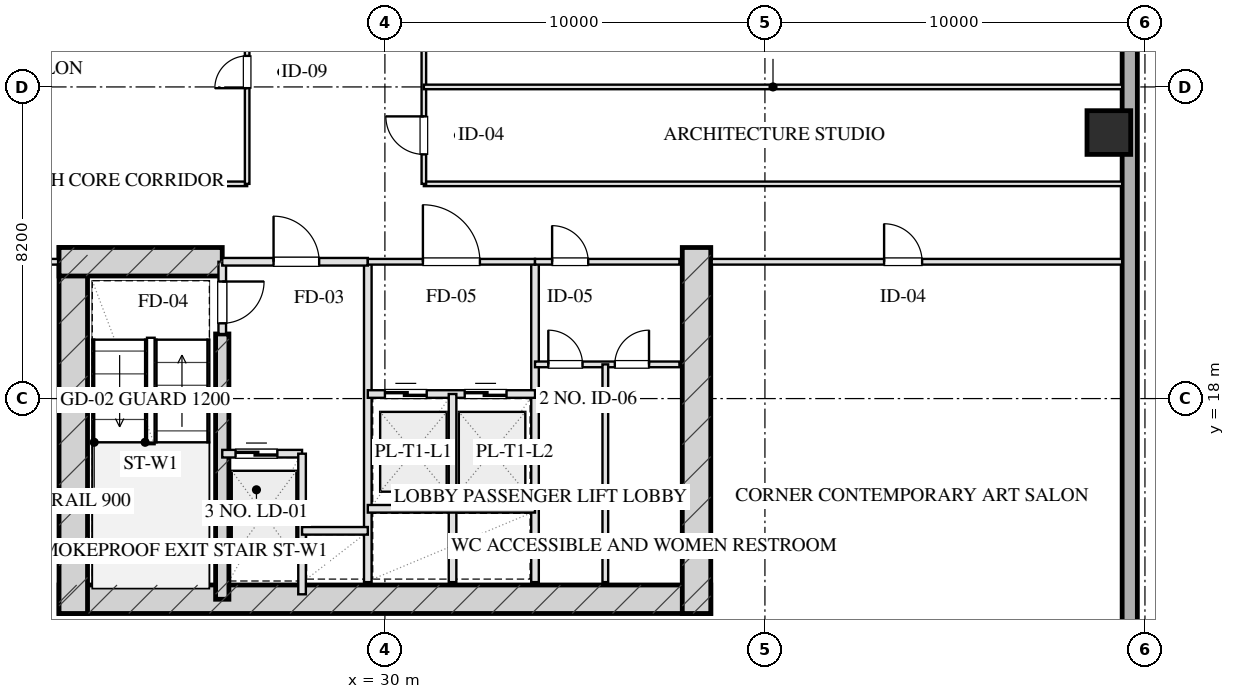
"""IFC4 building model, lengths in metres.
Left out: names, types, materials, properties, quantities, classifications, styles, units other than length and angle.
Written with IfcOpenShell. Run it as: python <this file> out.ifc"""

import sys

from ifc_helpers import new_model, si_unit, direction, frame, frame_2d, origin, origin_2d, place, context, subcontext, project, spatial, rectangle, hollow_rectangle, extrude, element, fill, save


model = new_model("IFC4")
c1 = context("Model", 3, precision=1e-05, world=origin(), true_north=direction((0.0, 1.0)))
c2 = subcontext(c1, "Body", "Model", "MODEL_VIEW")
j1 = project(units=[si_unit("LENGTHUNIT", "METRE"), si_unit("PLANEANGLEUNIT", "RADIAN")], contexts=[c1])
p1 = place(None, origin())
s1 = spatial("IfcSite", under=j1, at=p1, CompositionType="ELEMENT")
p2 = place(p1, origin())
s2 = spatial("IfcBuilding", under=s1, at=p2, CompositionType="ELEMENT")
p3 = place(p2, frame((0.0, 0.0, 54.05)))
s3 = spatial("IfcBuildingStorey", under=s2, at=p3, CompositionType="ELEMENT", Elevation=54.05)
p4 = place(p3, frame((21.425, 12.72, 0.0), z_axis=(0.0, 0.0, 1.0), x_axis=(1.0, 0.0, 0.0)))
e1 = element("IfcWall", 1, at=p4, inside=s3, PredefinedType="SHEAR", context=c2, shape_type="SweptSolid", body=[
    extrude(rectangle(XDim=17.15, YDim=0.75, at=frame_2d((8.575, 0.0))), origin(), (0.0, 0.0, 1.0), 3.45),
])
for number, where, z_axis, x_axis in (
    (2, (21.8, 21.975, 0.0), (0.0, 0.0, 1.0), (0.0, -1.0, 0.0)),
    (3, (38.2, 21.975, 0.0), (0.0, 0.0, 1.0), (0.0, -1.0, 0.0)),
):
    element("IfcWall", number, at=place(p3, frame(where, z_axis=z_axis, x_axis=x_axis)), inside=s3, PredefinedType="SHEAR", context=c2, shape_type="SweptSolid", body=[
        extrude(rectangle(XDim=9.63, YDim=0.75, at=frame_2d((4.815, 0.0))), origin(), (0.0, 0.0, 1.0), 3.45),
    ])
p5 = place(p3, frame((25.72, 19.7, 0.0), z_axis=(0.0, 0.0, 1.0), x_axis=(0.0, -1.0, 0.0)))
e4 = element("IfcWall", 4, at=p5, inside=s3, PredefinedType="SHEAR", context=c2, shape_type="SweptSolid", body=[
    extrude(rectangle(XDim=6.98, YDim=0.35, at=frame_2d((3.49, 0.0))), origin(), (0.0, 0.0, 1.0), 3.45),
])
p6 = place(p3, frame((21.425, 21.6, 0.0), z_axis=(0.0, 0.0, 1.0), x_axis=(1.0, 0.0, 0.0)))
e5 = element("IfcWall", 5, at=p6, inside=s3, PredefinedType="SHEAR", context=c2, shape_type="SweptSolid", body=[
    extrude(rectangle(XDim=4.295, YDim=0.75, at=frame_2d((2.147, 0.0))), origin(), (0.0, 0.0, 1.0), 3.45),
])
p7 = place(p3, frame((49.05, 25.0, 0.0), z_axis=(0.0, 0.0, 1.0), x_axis=(1.0, 0.0, 0.0)))
e6 = element("IfcColumn", 6, at=p7, inside=s3, PredefinedType="COLUMN", context=c2, shape_type="SweptSolid", body=[
    extrude(hollow_rectangle(XDim=1.15, YDim=1.15, WallThickness=0.04, at=origin_2d()), origin(), (0.0, 0.0, 1.0), 3.451),
])
p8 = place(p3, frame((49.6, 60.8, 0.0), z_axis=(0.0, 0.0, 1.0), x_axis=(0.0, -1.0, 0.0)))
e7 = element("IfcWall", 7, at=p8, inside=s3, PredefinedType="SOLIDWALL", context=c2, shape_type="SweptSolid", body=[
    extrude(rectangle(XDim=53.6, YDim=0.4, at=frame_2d((26.8, 0.0))), origin(), (0.0, 0.0, 1.0), 2.61),
])
p9 = place(p3, frame((25.72, 21.6, 0.0), z_axis=(0.0, 0.0, 1.0), x_axis=(0.0, -1.0, 0.0)))
e8 = element("IfcWall", 8, at=p9, inside=s3, PredefinedType="PARTITIONING", context=c2, shape_type="SweptSolid", body=[
    extrude(rectangle(XDim=1.9, YDim=0.2, at=frame_2d((0.95, 0.0))), origin(), (0.0, 0.0, 1.0), 3.175),
])
p10 = place(p9, frame((0.52, 0.0, 0.0)))
e9 = element("IfcOpeningElement", 9, at=p10, cuts=e8, PredefinedType="OPENING", context=c2, shape_type="SweptSolid", body=[
    extrude(rectangle(XDim=1.1, YDim=2.05, at=frame_2d((0.55, 1.025))), frame((0.0, 0.11, 0.0), z_axis=(0.0, -1.0, 0.0), x_axis=(1.0, 0.0, 0.0)), (0.0, 0.0, 1.0), 0.22),
])
p11 = place(p3, frame((29.55, 21.6, 0.0), z_axis=(0.0, 0.0, 1.0), x_axis=(0.0, -1.0, 0.0)))
e10 = element("IfcWall", 10, at=p11, inside=s3, PredefinedType="PARTITIONING", context=c2, shape_type="SweptSolid", body=[
    extrude(rectangle(XDim=8.43, YDim=0.2, at=frame_2d((4.215, 0.0))), origin(), (0.0, 0.0, 1.0), 3.175),
])
p12 = place(p3, frame((25.72, 21.6, 0.0), z_axis=(0.0, 0.0, 1.0), x_axis=(1.0, 0.0, 0.0)))
e11 = element("IfcWall", 11, at=p12, inside=s3, PredefinedType="PARTITIONING", context=c2, shape_type="SweptSolid", body=[
    extrude(rectangle(XDim=3.83, YDim=0.2, at=frame_2d((1.915, 0.0))), origin(), (0.0, 0.0, 1.0), 3.175),
])
p13 = place(p12, frame((1.35, 0.0, 0.0)))
e12 = element("IfcOpeningElement", 12, at=p13, cuts=e11, PredefinedType="OPENING", context=c2, shape_type="SweptSolid", body=[
    extrude(rectangle(XDim=1.2, YDim=2.05, at=frame_2d((0.6, 1.025))), frame((0.0, 0.11, 0.0), z_axis=(0.0, -1.0, 0.0), x_axis=(1.0, 0.0, 0.0)), (0.0, 0.0, 1.0), 0.22),
])
p14 = place(p3, frame((25.72, 16.55, 0.0), z_axis=(0.0, 0.0, 1.0), x_axis=(1.0, 0.0, 0.0)))
e13 = element("IfcWall", 13, at=p14, inside=s3, PredefinedType="PARTITIONING", context=c2, shape_type="SweptSolid", body=[
    extrude(rectangle(XDim=2.1, YDim=0.2, at=frame_2d((1.05, 0.0))), origin(), (0.0, 0.0, 1.0), 3.175),
])
p15 = place(p14, frame((0.35, 0.0, 0.0)))
e14 = element("IfcOpeningElement", 14, at=p15, cuts=e13, PredefinedType="OPENING", context=c2, shape_type="SweptSolid", body=[
    extrude(rectangle(XDim=1.1, YDim=2.05, at=frame_2d((0.55, 1.025))), frame((0.0, 0.11, 0.0), z_axis=(0.0, -1.0, 0.0), x_axis=(1.0, 0.0, 0.0)), (0.0, 0.0, 1.0), 0.22),
])
p16 = place(p3, frame((27.82, 16.55, 0.0), z_axis=(0.0, 0.0, 1.0), x_axis=(0.0, -1.0, 0.0)))
e15 = element("IfcWall", 15, at=p16, inside=s3, PredefinedType="PARTITIONING", context=c2, shape_type="SweptSolid", body=[
    extrude(rectangle(XDim=3.7, YDim=0.2, at=frame_2d((1.85, 0.0))), origin(), (0.0, 0.0, 1.0), 3.175),
])
p17 = place(p3, frame((27.82, 14.52, 0.0), z_axis=(0.0, 0.0, 1.0), x_axis=(1.0, 0.0, 0.0)))
e16 = element("IfcWall", 16, at=p17, inside=s3, PredefinedType="PARTITIONING", context=c2, shape_type="SweptSolid", body=[
    extrude(rectangle(XDim=1.73, YDim=0.2, at=frame_2d((0.865, 0.0))), origin(), (0.0, 0.0, 1.0), 3.175),
])
p18 = place(p3, frame((33.95, 21.6, 0.0), z_axis=(0.0, 0.0, 1.0), x_axis=(0.0, -1.0, 0.0)))
e17 = element("IfcWall", 17, at=p18, inside=s3, PredefinedType="PARTITIONING", context=c2, shape_type="SweptSolid", body=[
    extrude(rectangle(XDim=8.43, YDim=0.2, at=frame_2d((4.215, 0.0))), origin(), (0.0, 0.0, 1.0), 3.175),
])
p19 = place(p3, frame((29.55, 21.6, 0.0), z_axis=(0.0, 0.0, 1.0), x_axis=(1.0, 0.0, 0.0)))
e18 = element("IfcWall", 18, at=p19, inside=s3, PredefinedType="PARTITIONING", context=c2, shape_type="SweptSolid", body=[
    extrude(rectangle(XDim=4.4, YDim=0.15, at=frame_2d((2.2, 0.0))), origin(), (0.0, 0.0, 1.0), 3.175),
])
p20 = place(p19, frame((1.45, 0.0, 0.0)))
e19 = element("IfcOpeningElement", 19, at=p20, cuts=e18, PredefinedType="OPENING", context=c2, shape_type="SweptSolid", body=[
    extrude(rectangle(XDim=1.5, YDim=2.05, at=frame_2d((0.75, 1.025))), frame((0.0, 0.085, 0.0), z_axis=(0.0, -1.0, 0.0), x_axis=(1.0, 0.0, 0.0)), (0.0, 0.0, 1.0), 0.17),
])
p21 = place(p3, frame((29.55, 18.12, 0.0), z_axis=(0.0, 0.0, 1.0), x_axis=(1.0, 0.0, 0.0)))
e20 = element("IfcWall", 20, at=p21, inside=s3, PredefinedType="PARTITIONING", context=c2, shape_type="SweptSolid", body=[
    extrude(rectangle(XDim=4.4, YDim=0.2, at=frame_2d((2.2, 0.0))), origin(), (0.0, 0.0, 1.0), 3.175),
])
p22 = place(p21, frame((0.45, 0.0, 0.0)))
e21 = element("IfcOpeningElement", 21, at=p22, cuts=e20, PredefinedType="OPENING", context=c2, shape_type="SweptSolid", body=[
    extrude(rectangle(XDim=1.1, YDim=2.05, at=frame_2d((0.55, 1.025))), frame((0.0, 0.11, 0.0), z_axis=(0.0, -1.0, 0.0), x_axis=(1.0, 0.0, 0.0)), (0.0, 0.0, 1.0), 0.22),
])
p23 = place(p21, frame((2.55, 0.0, 0.0)))
e22 = element("IfcOpeningElement", 22, at=p23, cuts=e20, PredefinedType="OPENING", context=c2, shape_type="SweptSolid", body=[
    extrude(rectangle(XDim=1.1, YDim=2.05, at=frame_2d((0.55, 1.025))), frame((0.0, 0.11, 0.0), z_axis=(0.0, -1.0, 0.0), x_axis=(1.0, 0.0, 0.0)), (0.0, 0.0, 1.0), 0.22),
])
p24 = place(p3, frame((31.78, 18.12, 0.0), z_axis=(0.0, 0.0, 1.0), x_axis=(0.0, -1.0, 0.0)))
e23 = element("IfcWall", 23, at=p24, inside=s3, PredefinedType="PARTITIONING", context=c2, shape_type="SweptSolid", body=[
    extrude(rectangle(XDim=4.95, YDim=0.2, at=frame_2d((2.475, 0.0))), origin(), (0.0, 0.0, 1.0), 3.175),
])
p25 = place(p3, frame((29.55, 15.1, 0.0), z_axis=(0.0, 0.0, 1.0), x_axis=(1.0, 0.0, 0.0)))
e24 = element("IfcWall", 24, at=p25, inside=s3, PredefinedType="PARTITIONING", context=c2, shape_type="SweptSolid", body=[
    extrude(rectangle(XDim=4.4, YDim=0.2, at=frame_2d((2.2, 0.0))), origin(), (0.0, 0.0, 1.0), 3.175),
])
p26 = place(p3, frame((33.95, 21.6, 0.0), z_axis=(0.0, 0.0, 1.0), x_axis=(1.0, 0.0, 0.0)))
e25 = element("IfcWall", 25, at=p26, inside=s3, PredefinedType="PARTITIONING", context=c2, shape_type="SweptSolid", body=[
    extrude(rectangle(XDim=3.8, YDim=0.15, at=frame_2d((1.9, 0.0))), origin(), (0.0, 0.0, 1.0), 3.175),
])
p27 = place(p26, frame((0.45, 0.0, 0.0)))
e26 = element("IfcOpeningElement", 26, at=p27, cuts=e25, PredefinedType="OPENING", context=c2, shape_type="SweptSolid", body=[
    extrude(rectangle(XDim=0.95, YDim=2.05, at=frame_2d((0.475, 1.025))), frame((0.0, 0.085, 0.0), z_axis=(0.0, -1.0, 0.0), x_axis=(1.0, 0.0, 0.0)), (0.0, 0.0, 1.0), 0.17),
])
p28 = place(p3, frame((33.95, 18.9, 0.0), z_axis=(0.0, 0.0, 1.0), x_axis=(1.0, 0.0, 0.0)))
e27 = element("IfcWall", 27, at=p28, inside=s3, PredefinedType="PARTITIONING", context=c2, shape_type="SweptSolid", body=[
    extrude(rectangle(XDim=3.8, YDim=0.15, at=frame_2d((1.9, 0.0))), origin(), (0.0, 0.0, 1.0), 3.175),
])
p29 = place(p28, frame((0.35, 0.0, 0.0)))
e28 = element("IfcOpeningElement", 28, at=p29, cuts=e27, PredefinedType="OPENING", context=c2, shape_type="SweptSolid", body=[
    extrude(rectangle(XDim=0.9, YDim=2.05, at=frame_2d((0.45, 1.025))), frame((0.0, 0.085, 0.0), z_axis=(0.0, -1.0, 0.0), x_axis=(1.0, 0.0, 0.0)), (0.0, 0.0, 1.0), 0.17),
])
p30 = place(p28, frame((2.1, 0.0, 0.0)))
e29 = element("IfcOpeningElement", 29, at=p30, cuts=e27, PredefinedType="OPENING", context=c2, shape_type="SweptSolid", body=[
    extrude(rectangle(XDim=0.9, YDim=2.05, at=frame_2d((0.45, 1.025))), frame((0.0, 0.085, 0.0), z_axis=(0.0, -1.0, 0.0), x_axis=(1.0, 0.0, 0.0)), (0.0, 0.0, 1.0), 0.17),
])
p31 = place(p3, frame((35.8, 18.9, 0.0), z_axis=(0.0, 0.0, 1.0), x_axis=(0.0, -1.0, 0.0)))
e30 = element("IfcWall", 30, at=p31, inside=s3, PredefinedType="PARTITIONING", context=c2, shape_type="SweptSolid", body=[
    extrude(rectangle(XDim=5.73, YDim=0.15, at=frame_2d((2.865, 0.0))), origin(), (0.0, 0.0, 1.0), 3.175),
])
p32 = place(p3, frame((10.6, 21.6, 0.0), z_axis=(0.0, 0.0, 1.0), x_axis=(1.0, 0.0, 0.0)))
e31 = element("IfcWall", 31, at=p32, inside=s3, PredefinedType="PARTITIONING", context=c2, shape_type="SweptSolid", body=[
    extrude(rectangle(XDim=10.8, YDim=0.15, at=frame_2d((5.4, 0.0))), origin(), (0.0, 0.0, 1.0), 3.175),
])
p33 = place(p32, frame((4.536, 0.0, 0.0)))
e32 = element("IfcOpeningElement", 32, at=p33, cuts=e31, PredefinedType="OPENING", context=c2, shape_type="SweptSolid", body=[
    extrude(rectangle(XDim=1.0, YDim=2.05, at=frame_2d((0.5, 1.025))), frame((0.0, 0.085, 0.0), z_axis=(0.0, -1.0, 0.0), x_axis=(1.0, 0.0, 0.0)), (0.0, 0.0, 1.0), 0.17),
])
p34 = place(p3, frame((38.6, 21.6, 0.0), z_axis=(0.0, 0.0, 1.0), x_axis=(1.0, 0.0, 0.0)))
e33 = element("IfcWall", 33, at=p34, inside=s3, PredefinedType="PARTITIONING", context=c2, shape_type="SweptSolid", body=[
    extrude(rectangle(XDim=10.8, YDim=0.15, at=frame_2d((5.4, 0.0))), origin(), (0.0, 0.0, 1.0), 3.175),
])
p35 = place(p34, frame((4.536, 0.0, 0.0)))
e34 = element("IfcOpeningElement", 34, at=p35, cuts=e33, PredefinedType="OPENING", context=c2, shape_type="SweptSolid", body=[
    extrude(rectangle(XDim=1.0, YDim=2.05, at=frame_2d((0.5, 1.025))), frame((0.0, 0.085, 0.0), z_axis=(0.0, -1.0, 0.0), x_axis=(1.0, 0.0, 0.0)), (0.0, 0.0, 1.0), 0.17),
])
p36 = place(p3, frame((10.6, 23.65, 0.0), z_axis=(0.0, 0.0, 1.0), x_axis=(1.0, 0.0, 0.0)))
e35 = element("IfcWall", 35, at=p36, inside=s3, PredefinedType="PARTITIONING", context=c2, shape_type="SweptSolid", body=[
    extrude(rectangle(XDim=15.775, YDim=0.12, at=frame_2d((7.887, 0.0))), origin(), (0.0, 0.0, 1.0), 3.175),
])
p37 = place(p3, frame((31.025, 23.65, 0.0), z_axis=(0.0, 0.0, 1.0), x_axis=(1.0, 0.0, 0.0)))
e36 = element("IfcWall", 36, at=p37, inside=s3, PredefinedType="PARTITIONING", context=c2, shape_type="SweptSolid", body=[
    extrude(rectangle(XDim=18.375, YDim=0.12, at=frame_2d((9.188, 0.0))), origin(), (0.0, 0.0, 1.0), 3.175),
])
p38 = place(p3, frame((26.375, 23.65, 0.0), z_axis=(0.0, 0.0, 1.0), x_axis=(0.0, 1.0, 0.0)))
e37 = element("IfcWall", 37, at=p38, inside=s3, PredefinedType="PARTITIONING", context=c2, shape_type="SweptSolid", body=[
    extrude(rectangle(XDim=20.7, YDim=0.12, at=frame_2d((10.35, 0.0))), origin(), (0.0, 0.0, 1.0), 3.175),
])
p39 = place(p38, frame((2.518, 0.0, 0.0)))
e38 = element("IfcOpeningElement", 38, at=p39, cuts=e37, PredefinedType="OPENING", context=c2, shape_type="SweptSolid", body=[
    extrude(rectangle(XDim=0.85, YDim=2.05, at=frame_2d((0.425, 1.025))), frame((0.0, 0.07, 0.0), z_axis=(0.0, -1.0, 0.0), x_axis=(1.0, 0.0, 0.0)), (0.0, 0.0, 1.0), 0.14),
])
p40 = place(p38, frame((9.692, 0.0, 0.0)))
e39 = element("IfcOpeningElement", 39, at=p40, cuts=e37, PredefinedType="OPENING", context=c2, shape_type="SweptSolid", body=[
    extrude(rectangle(XDim=1.0, YDim=2.05, at=frame_2d((0.5, 1.025))), frame((0.0, 0.07, 0.0), z_axis=(0.0, -1.0, 0.0), x_axis=(1.0, 0.0, 0.0)), (0.0, 0.0, 1.0), 0.14),
])
p41 = place(p38, frame((17.025, 0.0, 0.0)))
e40 = element("IfcOpeningElement", 40, at=p41, cuts=e37, PredefinedType="OPENING", context=c2, shape_type="SweptSolid", body=[
    extrude(rectangle(XDim=1.0, YDim=2.05, at=frame_2d((0.5, 1.025))), frame((0.0, 0.07, 0.0), z_axis=(0.0, -1.0, 0.0), x_axis=(1.0, 0.0, 0.0)), (0.0, 0.0, 1.0), 0.14),
])
p42 = place(p3, frame((31.025, 23.65, 0.0), z_axis=(0.0, 0.0, 1.0), x_axis=(0.0, 1.0, 0.0)))
e41 = element("IfcWall", 41, at=p42, inside=s3, PredefinedType="PARTITIONING", context=c2, shape_type="SweptSolid", body=[
    extrude(rectangle(XDim=20.7, YDim=0.12, at=frame_2d((10.35, 0.0))), origin(), (0.0, 0.0, 1.0), 3.175),
])
p43 = place(p42, frame((0.775, 0.0, 0.0)))
e42 = element("IfcOpeningElement", 42, at=p43, cuts=e41, PredefinedType="OPENING", context=c2, shape_type="SweptSolid", body=[
    extrude(rectangle(XDim=1.0, YDim=2.05, at=frame_2d((0.5, 1.025))), frame((0.0, 0.07, 0.0), z_axis=(0.0, -1.0, 0.0), x_axis=(1.0, 0.0, 0.0)), (0.0, 0.0, 1.0), 0.14),
])
p44 = place(p42, frame((3.95, 0.0, 0.0)))
e43 = element("IfcOpeningElement", 43, at=p44, cuts=e41, PredefinedType="OPENING", context=c2, shape_type="SweptSolid", body=[
    extrude(rectangle(XDim=1.0, YDim=2.05, at=frame_2d((0.5, 1.025))), frame((0.0, 0.07, 0.0), z_axis=(0.0, -1.0, 0.0), x_axis=(1.0, 0.0, 0.0)), (0.0, 0.0, 1.0), 0.14),
])
p45 = place(p42, frame((8.455, 0.0, 0.0)))
e44 = element("IfcOpeningElement", 44, at=p45, cuts=e41, PredefinedType="OPENING", context=c2, shape_type="SweptSolid", body=[
    extrude(rectangle(XDim=1.05, YDim=2.05, at=frame_2d((0.525, 1.025))), frame((0.0, 0.07, 0.0), z_axis=(0.0, -1.0, 0.0), x_axis=(1.0, 0.0, 0.0)), (0.0, 0.0, 1.0), 0.14),
])
p46 = place(p42, frame((12.923, 0.0, 0.0)))
e45 = element("IfcOpeningElement", 45, at=p46, cuts=e41, PredefinedType="OPENING", context=c2, shape_type="SweptSolid", body=[
    extrude(rectangle(XDim=1.0, YDim=2.05, at=frame_2d((0.5, 1.025))), frame((0.0, 0.07, 0.0), z_axis=(0.0, -1.0, 0.0), x_axis=(1.0, 0.0, 0.0)), (0.0, 0.0, 1.0), 0.14),
])
p47 = place(p42, frame((16.338, 0.0, 0.0)))
e46 = element("IfcOpeningElement", 46, at=p47, cuts=e41, PredefinedType="OPENING", context=c2, shape_type="SweptSolid", body=[
    extrude(rectangle(XDim=1.0, YDim=2.05, at=frame_2d((0.5, 1.025))), frame((0.0, 0.07, 0.0), z_axis=(0.0, -1.0, 0.0), x_axis=(1.0, 0.0, 0.0)), (0.0, 0.0, 1.0), 0.14),
])
p48 = place(p42, frame((19.045, 0.0, 0.0)))
e47 = element("IfcOpeningElement", 47, at=p48, cuts=e41, PredefinedType="OPENING", context=c2, shape_type="SweptSolid", body=[
    extrude(rectangle(XDim=1.0, YDim=2.05, at=frame_2d((0.5, 1.025))), frame((0.0, 0.07, 0.0), z_axis=(0.0, -1.0, 0.0), x_axis=(1.0, 0.0, 0.0)), (0.0, 0.0, 1.0), 0.14),
])
p49 = place(p3, frame((31.025, 26.2, 0.0), z_axis=(0.0, 0.0, 1.0), x_axis=(1.0, 0.0, 0.0)))
e48 = element("IfcWall", 48, at=p49, inside=s3, PredefinedType="PARTITIONING", context=c2, shape_type="SweptSolid", body=[
    extrude(rectangle(XDim=18.375, YDim=0.12, at=frame_2d((9.188, 0.0))), origin(), (0.0, 0.0, 1.0), 3.175),
])
p50 = place(p10, origin())
e49 = element("IfcDoor", 49, at=p50, inside=s3, OperationType="SINGLE_SWING_LEFT", PredefinedType="DOOR", context=c2, shape_type="SweptSolid", body=[
    extrude(rectangle(XDim=1.1, YDim=2.05, at=frame_2d((0.55, 1.025))), frame((0.0, 0.025, 0.0), z_axis=(0.0, -1.0, 0.0), x_axis=(1.0, 0.0, 0.0)), (0.0, 0.0, 1.0), 0.05),
])
fill(e9, e49)
p51 = place(p13, origin())
e50 = element("IfcDoor", 50, at=p51, inside=s3, OperationType="SINGLE_SWING_LEFT", PredefinedType="DOOR", context=c2, shape_type="SweptSolid", body=[
    extrude(rectangle(XDim=1.2, YDim=2.05, at=frame_2d((0.6, 1.025))), frame((0.0, 0.025, 0.0), z_axis=(0.0, -1.0, 0.0), x_axis=(1.0, 0.0, 0.0)), (0.0, 0.0, 1.0), 0.05),
])
fill(e12, e50)
p52 = place(p15, origin())
e51 = element("IfcDoor", 51, at=p52, inside=s3, OperationType="DOUBLE_DOOR_SLIDING", PredefinedType="DOOR", context=c2, shape_type="SweptSolid", body=[
    extrude(rectangle(XDim=1.1, YDim=2.05, at=frame_2d((0.55, 1.025))), frame((0.0, 0.025, 0.0), z_axis=(0.0, -1.0, 0.0), x_axis=(1.0, 0.0, 0.0)), (0.0, 0.0, 1.0), 0.05),
])
fill(e14, e51)
p53 = place(p20, origin())
e52 = element("IfcDoor", 52, at=p53, inside=s3, OperationType="SINGLE_SWING_LEFT", PredefinedType="DOOR", context=c2, shape_type="SweptSolid", body=[
    extrude(rectangle(XDim=1.5, YDim=2.05, at=frame_2d((0.75, 1.025))), frame((0.0, 0.025, 0.0), z_axis=(0.0, -1.0, 0.0), x_axis=(1.0, 0.0, 0.0)), (0.0, 0.0, 1.0), 0.05),
])
fill(e19, e52)
p54 = place(p22, origin())
e53 = element("IfcDoor", 53, at=p54, inside=s3, OperationType="DOUBLE_DOOR_SLIDING", PredefinedType="DOOR", context=c2, shape_type="SweptSolid", body=[
    extrude(rectangle(XDim=1.1, YDim=2.05, at=frame_2d((0.55, 1.025))), frame((0.0, 0.025, 0.0), z_axis=(0.0, -1.0, 0.0), x_axis=(1.0, 0.0, 0.0)), (0.0, 0.0, 1.0), 0.05),
])
fill(e21, e53)
p55 = place(p23, origin())
e54 = element("IfcDoor", 54, at=p55, inside=s3, OperationType="DOUBLE_DOOR_SLIDING", PredefinedType="DOOR", context=c2, shape_type="SweptSolid", body=[
    extrude(rectangle(XDim=1.1, YDim=2.05, at=frame_2d((0.55, 1.025))), frame((0.0, 0.025, 0.0), z_axis=(0.0, -1.0, 0.0), x_axis=(1.0, 0.0, 0.0)), (0.0, 0.0, 1.0), 0.05),
])
fill(e22, e54)
p56 = place(p27, origin())
e55 = element("IfcDoor", 55, at=p56, inside=s3, OperationType="SINGLE_SWING_LEFT", PredefinedType="DOOR", context=c2, shape_type="SweptSolid", body=[
    extrude(rectangle(XDim=0.95, YDim=2.05, at=frame_2d((0.475, 1.025))), frame((0.0, 0.025, 0.0), z_axis=(0.0, -1.0, 0.0), x_axis=(1.0, 0.0, 0.0)), (0.0, 0.0, 1.0), 0.05),
])
fill(e26, e55)
p57 = place(p29, origin())
e56 = element("IfcDoor", 56, at=p57, inside=s3, OperationType="SINGLE_SWING_LEFT", PredefinedType="DOOR", context=c2, shape_type="SweptSolid", body=[
    extrude(rectangle(XDim=0.9, YDim=2.05, at=frame_2d((0.45, 1.025))), frame((0.0, 0.025, 0.0), z_axis=(0.0, -1.0, 0.0), x_axis=(1.0, 0.0, 0.0)), (0.0, 0.0, 1.0), 0.05),
])
fill(e28, e56)
p58 = place(p30, origin())
e57 = element("IfcDoor", 57, at=p58, inside=s3, OperationType="SINGLE_SWING_RIGHT", PredefinedType="DOOR", context=c2, shape_type="SweptSolid", body=[
    extrude(rectangle(XDim=0.9, YDim=2.05, at=frame_2d((0.45, 1.025))), frame((0.0, 0.025, 0.0), z_axis=(0.0, -1.0, 0.0), x_axis=(1.0, 0.0, 0.0)), (0.0, 0.0, 1.0), 0.05),
])
fill(e29, e57)
p59 = place(p35, origin())
e58 = element("IfcDoor", 58, at=p59, inside=s3, OperationType="SINGLE_SWING_LEFT", PredefinedType="DOOR", context=c2, shape_type="SweptSolid", body=[
    extrude(rectangle(XDim=1.0, YDim=2.05, at=frame_2d((0.5, 1.025))), frame((0.0, 0.025, 0.0), z_axis=(0.0, -1.0, 0.0), x_axis=(1.0, 0.0, 0.0)), (0.0, 0.0, 1.0), 0.05),
])
fill(e34, e58)
p60 = place(p39, origin())
e59 = element("IfcDoor", 59, at=p60, inside=s3, OperationType="SINGLE_SWING_LEFT", PredefinedType="DOOR", context=c2, shape_type="SweptSolid", body=[
    extrude(rectangle(XDim=0.85, YDim=2.05, at=frame_2d((0.425, 1.025))), frame((0.0, 0.025, 0.0), z_axis=(0.0, -1.0, 0.0), x_axis=(1.0, 0.0, 0.0)), (0.0, 0.0, 1.0), 0.05),
])
fill(e38, e59)
p61 = place(p43, origin())
e60 = element("IfcDoor", 60, at=p61, inside=s3, OperationType="SINGLE_SWING_RIGHT", PredefinedType="DOOR", context=c2, shape_type="SweptSolid", body=[
    extrude(rectangle(XDim=1.0, YDim=2.05, at=frame_2d((0.5, 1.025))), frame((0.0, 0.025, 0.0), z_axis=(0.0, -1.0, 0.0), x_axis=(1.0, 0.0, 0.0)), (0.0, 0.0, 1.0), 0.05),
])
fill(e42, e60)
save(model, sys.argv[1])
